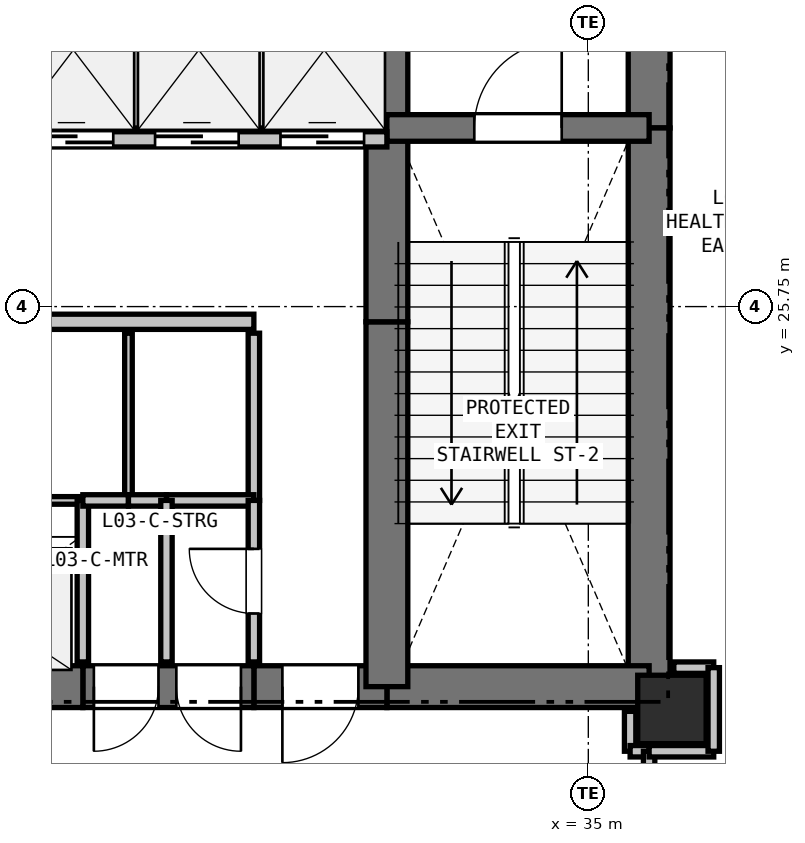
"""IFC4 building model, lengths in metres.
Left out: names, types, materials, properties, quantities, classifications, styles, units other than length and angle.
Written with IfcOpenShell. Run it as: python <this file> out.ifc"""

import sys

from ifc_helpers import new_model, si_unit, direction, frame, frame_2d, origin, origin_2d, place, context, subcontext, project, spatial, rectangle, extrude, element, fill, save


model = new_model("IFC4")
c1 = context("Model", 3, precision=1e-05, world=origin(), true_north=direction((0.0, 1.0)))
c2 = subcontext(c1, "Body", "Model", "MODEL_VIEW")
j1 = project(units=[si_unit("LENGTHUNIT", "METRE"), si_unit("PLANEANGLEUNIT", "RADIAN")], contexts=[c1])
p1 = place(None, origin())
s1 = spatial("IfcSite", under=j1, at=p1, CompositionType="ELEMENT")
p2 = place(p1, origin())
s2 = spatial("IfcBuilding", under=s1, at=p2, CompositionType="ELEMENT")
p3 = place(p2, frame((0.0, 0.0, 14.4)))
s3 = spatial("IfcBuildingStorey", under=s2, at=p3, CompositionType="ELEMENT", Elevation=14.4)
p4 = place(p3, frame((36.1, 20.45, 0.0), z_axis=(0.0, 0.0, 1.0), x_axis=(1.0, 0.0, 0.0)))
e1 = element("IfcColumn", 1, at=p4, inside=s3, PredefinedType="COLUMN", context=c2, shape_type="SweptSolid", body=[
    extrude(rectangle(XDim=0.9, YDim=0.9, at=origin_2d()), origin(), (0.0, 0.0, 1.0), 4.8),
])
p5 = place(p3, frame((35.8, 32.75, 0.0), z_axis=(0.0, 0.0, 1.0), x_axis=(0.0, -1.0, 0.0)))
e2 = element("IfcWall", 2, at=p5, inside=s3, PredefinedType="SHEAR", context=c2, shape_type="SweptSolid", body=[
    extrude(rectangle(XDim=4.65, YDim=0.55, at=frame_2d((2.325, 0.0))), origin(), (0.0, 0.0, 1.0), 4.52),
])
p6 = place(p3, frame((35.8, 28.1, 0.0), z_axis=(0.0, 0.0, 1.0), x_axis=(0.0, -1.0, 0.0)))
e3 = element("IfcWall", 3, at=p6, inside=s3, PredefinedType="SHEAR", context=c2, shape_type="SweptSolid", body=[
    extrude(rectangle(XDim=7.35, YDim=0.55, at=frame_2d((3.675, 0.0))), origin(), (0.0, 0.0, 1.0), 4.52),
])
p7 = place(p3, frame((35.8, 20.75, 0.0), z_axis=(0.0, 0.0, 1.0), x_axis=(-1.0, 0.0, 0.0)))
e4 = element("IfcWall", 4, at=p7, inside=s3, PredefinedType="SHEAR", context=c2, shape_type="SweptSolid", body=[
    extrude(rectangle(XDim=3.45, YDim=0.55, at=frame_2d((1.725, 0.0))), origin(), (0.0, 0.0, 1.0), 4.52),
])
p8 = place(p3, frame((32.35, 20.75, 0.0), z_axis=(0.0, 0.0, 1.0), x_axis=(-1.0, 0.0, 0.0)))
e5 = element("IfcWall", 5, at=p8, inside=s3, PredefinedType="SHEAR", context=c2, shape_type="SweptSolid", body=[
    extrude(rectangle(XDim=1.75, YDim=0.55, at=frame_2d((0.875, 0.0))), origin(), (0.0, 0.0, 1.0), 4.52),
])
p9 = place(p8, frame((0.375, 0.0, 0.0)))
e6 = element("IfcOpeningElement", 6, at=p9, cuts=e5, PredefinedType="OPENING", context=c2, shape_type="SweptSolid", body=[
    extrude(rectangle(XDim=1.0, YDim=2.15, at=frame_2d((0.5, 1.075))), frame((0.0, 0.285, 0.0), z_axis=(0.0, -1.0, 0.0), x_axis=(1.0, 0.0, 0.0)), (0.0, 0.0, 1.0), 0.57),
])
p10 = place(p3, frame((30.6, 20.75, 0.0), z_axis=(0.0, 0.0, 1.0), x_axis=(-1.0, 0.0, 0.0)))
e7 = element("IfcWall", 7, at=p10, inside=s3, PredefinedType="SHEAR", context=c2, shape_type="SweptSolid", body=[
    extrude(rectangle(XDim=2.25, YDim=0.55, at=frame_2d((1.125, 0.0))), origin(), (0.0, 0.0, 1.0), 4.52),
])
p11 = place(p10, frame((1.255, 0.0, 0.0)))
e8 = element("IfcOpeningElement", 8, at=p11, cuts=e7, PredefinedType="OPENING", context=c2, shape_type="SweptSolid", body=[
    extrude(rectangle(XDim=0.85, YDim=2.1, at=frame_2d((0.425, 1.05))), frame((0.0, 0.285, 0.0), z_axis=(0.0, -1.0, 0.0), x_axis=(1.0, 0.0, 0.0)), (0.0, 0.0, 1.0), 0.57),
])
p12 = place(p10, frame((0.17, 0.0, 0.0)))
e9 = element("IfcOpeningElement", 9, at=p12, cuts=e7, PredefinedType="OPENING", context=c2, shape_type="SweptSolid", body=[
    extrude(rectangle(XDim=0.85, YDim=2.1, at=frame_2d((0.425, 1.05))), frame((0.0, 0.285, 0.0), z_axis=(0.0, -1.0, 0.0), x_axis=(1.0, 0.0, 0.0)), (0.0, 0.0, 1.0), 0.57),
])
p13 = place(p3, frame((28.35, 20.75, 0.0), z_axis=(0.0, 0.0, 1.0), x_axis=(-1.0, 0.0, 0.0)))
e10 = element("IfcWall", 10, at=p13, inside=s3, PredefinedType="SHEAR", context=c2, shape_type="SweptSolid", body=[
    extrude(rectangle(XDim=2.7, YDim=0.55, at=frame_2d((1.35, 0.0))), origin(), (0.0, 0.0, 1.0), 4.52),
])
p14 = place(p3, frame((32.35, 20.75, 0.0), z_axis=(0.0, 0.0, 1.0), x_axis=(0.0, 1.0, 0.0)))
e11 = element("IfcWall", 11, at=p14, inside=s3, PredefinedType="SHEAR", context=c2, shape_type="SweptSolid", body=[
    extrude(rectangle(XDim=4.8, YDim=0.55, at=frame_2d((2.4, 0.0))), origin(), (0.0, 0.0, 1.0), 4.52),
])
p15 = place(p3, frame((32.35, 25.55, 0.0), z_axis=(0.0, 0.0, 1.0), x_axis=(0.0, 1.0, 0.0)))
e12 = element("IfcWall", 12, at=p15, inside=s3, PredefinedType="SHEAR", context=c2, shape_type="SweptSolid", body=[
    extrude(rectangle(XDim=2.4, YDim=0.55, at=frame_2d((1.2, 0.0))), origin(), (0.0, 0.0, 1.0), 4.52),
])
p16 = place(p3, frame((32.35, 27.95, 0.0), z_axis=(0.0, 0.0, 1.0), x_axis=(0.0, 1.0, 0.0)))
e13 = element("IfcWall", 13, at=p16, inside=s3, PredefinedType="SHEAR", context=c2, shape_type="SweptSolid", body=[
    extrude(rectangle(XDim=2.8, YDim=0.55, at=frame_2d((1.4, 0.0))), origin(), (0.0, 0.0, 1.0), 4.52),
])
p17 = place(p3, frame((32.35, 28.1, 0.0), z_axis=(0.0, 0.0, 1.0), x_axis=(1.0, 0.0, 0.0)))
e14 = element("IfcWall", 14, at=p17, inside=s3, PredefinedType="SHEAR", context=c2, shape_type="SweptSolid", body=[
    extrude(rectangle(XDim=3.45, YDim=0.35, at=frame_2d((1.725, 0.0))), origin(), (0.0, 0.0, 1.0), 4.52),
])
p18 = place(p17, frame((1.15, 0.0, 0.0)))
e15 = element("IfcOpeningElement", 15, at=p18, cuts=e14, PredefinedType="OPENING", context=c2, shape_type="SweptSolid", body=[
    extrude(rectangle(XDim=1.15, YDim=2.15, at=frame_2d((0.575, 1.075))), frame((0.0, 0.185, 0.0), z_axis=(0.0, -1.0, 0.0), x_axis=(1.0, 0.0, 0.0)), (0.0, 0.0, 1.0), 0.37),
])
p19 = place(p3, frame((25.65, 25.55, 0.0), z_axis=(0.0, 0.0, 1.0), x_axis=(1.0, 0.0, 0.0)))
e16 = element("IfcWall", 16, at=p19, inside=s3, PredefinedType="PARTITIONING", context=c2, shape_type="SweptSolid", body=[
    extrude(rectangle(XDim=4.95, YDim=0.2, at=frame_2d((2.475, 0.0))), origin(), (0.0, 0.0, 1.0), 4.52),
])
p20 = place(p3, frame((27.4, 27.95, 0.0), z_axis=(0.0, 0.0, 1.0), x_axis=(1.0, 0.0, 0.0)))
e17 = element("IfcWall", 17, at=p20, inside=s3, PredefinedType="PARTITIONING", context=c2, shape_type="SweptSolid", body=[
    extrude(rectangle(XDim=4.95, YDim=0.2, at=frame_2d((2.475, 0.0))), origin(), (0.0, 0.0, 1.0), 4.52),
])
p21 = place(p20, frame((0.25, 0.0, 0.0)))
e18 = element("IfcOpeningElement", 18, at=p21, cuts=e17, PredefinedType="OPENING", context=c2, shape_type="SweptSolid", body=[
    extrude(rectangle(XDim=1.1, YDim=2.15, at=frame_2d((0.55, 1.075))), frame((0.0, 0.11, 0.0), z_axis=(0.0, -1.0, 0.0), x_axis=(1.0, 0.0, 0.0)), (0.0, 0.0, 1.0), 0.22),
])
p22 = place(p20, frame((1.9, 0.0, 0.0)))
e19 = element("IfcOpeningElement", 19, at=p22, cuts=e17, PredefinedType="OPENING", context=c2, shape_type="SweptSolid", body=[
    extrude(rectangle(XDim=1.1, YDim=2.15, at=frame_2d((0.55, 1.075))), frame((0.0, 0.11, 0.0), z_axis=(0.0, -1.0, 0.0), x_axis=(1.0, 0.0, 0.0)), (0.0, 0.0, 1.0), 0.22),
])
p23 = place(p20, frame((3.55, 0.0, 0.0)))
e20 = element("IfcOpeningElement", 20, at=p23, cuts=e17, PredefinedType="OPENING", context=c2, shape_type="SweptSolid", body=[
    extrude(rectangle(XDim=1.1, YDim=2.15, at=frame_2d((0.55, 1.075))), frame((0.0, 0.11, 0.0), z_axis=(0.0, -1.0, 0.0), x_axis=(1.0, 0.0, 0.0)), (0.0, 0.0, 1.0), 0.22),
])
p24 = place(p3, frame((27.3, 23.2, 0.0), z_axis=(0.0, 0.0, 1.0), x_axis=(1.0, 0.0, 0.0)))
e21 = element("IfcWall", 21, at=p24, inside=s3, PredefinedType="PARTITIONING", context=c2, shape_type="SweptSolid", body=[
    extrude(rectangle(XDim=1.05, YDim=0.1, at=frame_2d((0.525, 0.0))), origin(), (0.0, 0.0, 1.0), 4.52),
])
p25 = place(p3, frame((28.35, 23.2, 0.0), z_axis=(0.0, 0.0, 1.0), x_axis=(0.0, -1.0, 0.0)))
e22 = element("IfcWall", 22, at=p25, inside=s3, PredefinedType="PARTITIONING", context=c2, shape_type="SweptSolid", body=[
    extrude(rectangle(XDim=2.125, YDim=0.15, at=frame_2d((1.062, 0.0))), origin(), (0.0, 0.0, 1.0), 4.52),
])
p26 = place(p3, frame((28.95, 25.4, 0.0), z_axis=(0.0, 0.0, 1.0), x_axis=(0.0, -1.0, 0.0)))
e23 = element("IfcWall", 23, at=p26, inside=s3, PredefinedType="PARTITIONING", context=c2, shape_type="SweptSolid", body=[
    extrude(rectangle(XDim=2.2, YDim=0.1, at=frame_2d((1.1, 0.0))), origin(), (0.0, 0.0, 1.0), 4.52),
])
p27 = place(p3, frame((28.95, 23.2, 0.0), z_axis=(0.0, 0.0, 1.0), x_axis=(-1.0, 0.0, 0.0)))
e24 = element("IfcWall", 24, at=p27, inside=s3, PredefinedType="PARTITIONING", context=c2, shape_type="SweptSolid", body=[
    extrude(rectangle(XDim=0.6, YDim=0.15, at=frame_2d((0.3, 0.0))), origin(), (0.0, 0.0, 1.0), 4.52),
])
p28 = place(p3, frame((30.6, 25.4, 0.0), z_axis=(0.0, 0.0, 1.0), x_axis=(0.0, -1.0, 0.0)))
e25 = element("IfcWall", 25, at=p28, inside=s3, PredefinedType="PARTITIONING", context=c2, shape_type="SweptSolid", body=[
    extrude(rectangle(XDim=2.2, YDim=0.15, at=frame_2d((1.1, 0.0))), origin(), (0.0, 0.0, 1.0), 4.52),
])
p29 = place(p3, frame((30.6, 23.2, 0.0), z_axis=(0.0, 0.0, 1.0), x_axis=(-1.0, 0.0, 0.0)))
e26 = element("IfcWall", 26, at=p29, inside=s3, PredefinedType="PARTITIONING", context=c2, shape_type="SweptSolid", body=[
    extrude(rectangle(XDim=1.15, YDim=0.15, at=frame_2d((0.575, 0.0))), origin(), (0.0, 0.0, 1.0), 4.52),
])
p30 = place(p3, frame((29.45, 23.2, 0.0), z_axis=(0.0, 0.0, 1.0), x_axis=(-1.0, 0.0, 0.0)))
e27 = element("IfcWall", 27, at=p30, inside=s3, PredefinedType="PARTITIONING", context=c2, shape_type="SweptSolid", body=[
    extrude(rectangle(XDim=0.5, YDim=0.15, at=frame_2d((0.25, 0.0))), origin(), (0.0, 0.0, 1.0), 4.52),
])
p31 = place(p3, frame((29.05, 30.3, 0.0), z_axis=(0.0, 0.0, 1.0), x_axis=(0.0, -1.0, 0.0)))
e28 = element("IfcWall", 28, at=p31, inside=s3, PredefinedType="PARTITIONING", context=c2, shape_type="SweptSolid", body=[
    extrude(rectangle(XDim=2.2, YDim=0.1, at=frame_2d((1.1, 0.0))), origin(), (0.0, 0.0, 1.0), 4.52),
])
p32 = place(p3, frame((30.7, 30.3, 0.0), z_axis=(0.0, 0.0, 1.0), x_axis=(0.0, -1.0, 0.0)))
e29 = element("IfcWall", 29, at=p32, inside=s3, PredefinedType="PARTITIONING", context=c2, shape_type="SweptSolid", body=[
    extrude(rectangle(XDim=2.2, YDim=0.125, at=frame_2d((1.1, 0.0))), origin(), (0.0, 0.0, 1.0), 4.52),
])
p33 = place(p3, frame((30.6, 21.075, 0.0), z_axis=(0.0, 0.0, 1.0), x_axis=(0.0, 1.0, 0.0)))
e30 = element("IfcWall", 30, at=p33, inside=s3, PredefinedType="PARTITIONING", context=c2, shape_type="SweptSolid", body=[
    extrude(rectangle(XDim=2.125, YDim=0.15, at=frame_2d((1.062, 0.0))), origin(), (0.0, 0.0, 1.0), 4.52),
])
p34 = place(p33, frame((0.637, 0.0, 0.0)))
e31 = element("IfcOpeningElement", 31, at=p34, cuts=e30, PredefinedType="OPENING", context=c2, shape_type="SweptSolid", body=[
    extrude(rectangle(XDim=0.85, YDim=2.1, at=frame_2d((0.425, 1.05))), frame((0.0, 0.085, 0.0), z_axis=(0.0, -1.0, 0.0), x_axis=(1.0, 0.0, 0.0)), (0.0, 0.0, 1.0), 0.17),
])
p35 = place(p3, frame((35.55, 20.425, 0.0), z_axis=(0.0, 0.0, 1.0), x_axis=(0.0, -1.0, 0.0)))
e32 = element("IfcWall", 32, at=p35, inside=s3, PredefinedType="PARTITIONING", context=c2, shape_type="SweptSolid", body=[
    extrude(rectangle(XDim=0.525, YDim=0.15, at=frame_2d((0.263, 0.0))), origin(), (0.0, 0.0, 1.0), 3.969),
])
p36 = place(p3, frame((35.55, 19.9, 0.0), z_axis=(0.0, 0.0, 1.0), x_axis=(1.0, 0.0, 0.0)))
e33 = element("IfcWall", 33, at=p36, inside=s3, PredefinedType="PARTITIONING", context=c2, shape_type="SweptSolid", body=[
    extrude(rectangle(XDim=0.25, YDim=0.15, at=frame_2d((0.125, 0.0))), origin(), (0.0, 0.0, 1.0), 4.52),
])
p37 = place(p3, frame((35.8, 19.9, 0.0), z_axis=(0.0, 0.0, 1.0), x_axis=(0.0, -1.0, 0.0)))
e34 = element("IfcWall", 34, at=p37, inside=s3, PredefinedType="PARTITIONING", context=c2, shape_type="SweptSolid", body=[
    extrude(rectangle(XDim=2.45, YDim=0.15, at=frame_2d((1.225, 0.0))), origin(), (0.0, 0.0, 1.0), 4.52),
])
p38 = place(p37, frame((0.725, 0.0, 0.0)))
e35 = element("IfcOpeningElement", 35, at=p38, cuts=e34, PredefinedType="OPENING", context=c2, shape_type="SweptSolid", body=[
    extrude(rectangle(XDim=1.0, YDim=2.15, at=frame_2d((0.5, 1.075))), frame((0.0, 0.085, 0.0), z_axis=(0.0, -1.0, 0.0), x_axis=(1.0, 0.0, 0.0)), (0.0, 0.0, 1.0), 0.17),
])
p39 = place(p3, frame((36.65, 21.0, 0.0), z_axis=(0.0, 0.0, 1.0), x_axis=(-1.0, 0.0, 0.0)))
e36 = element("IfcWall", 36, at=p39, inside=s3, PredefinedType="PARTITIONING", context=c2, shape_type="SweptSolid", body=[
    extrude(rectangle(XDim=0.525, YDim=0.15, at=frame_2d((0.262, 0.0))), origin(), (0.0, 0.0, 1.0), 3.969),
])
p40 = place(p3, frame((35.8, 19.9, 0.0), z_axis=(0.0, 0.0, 1.0), x_axis=(1.0, 0.0, 0.0)))
e37 = element("IfcWall", 37, at=p40, inside=s3, PredefinedType="PARTITIONING", context=c2, shape_type="SweptSolid", body=[
    extrude(rectangle(XDim=0.85, YDim=0.15, at=frame_2d((0.425, 0.0))), origin(), (0.0, 0.0, 1.0), 3.818),
])
p41 = place(p3, frame((36.65, 19.9, 0.0), z_axis=(0.0, 0.0, 1.0), x_axis=(0.0, 1.0, 0.0)))
e38 = element("IfcWall", 38, at=p41, inside=s3, PredefinedType="PARTITIONING", context=c2, shape_type="SweptSolid", body=[
    extrude(rectangle(XDim=1.1, YDim=0.15, at=frame_2d((0.55, 0.0))), origin(), (0.0, 0.0, 1.0), 4.52),
])
p42 = place(p3, frame((29.45, 23.2, 0.0), z_axis=(0.0, 0.0, 1.0), x_axis=(0.0, -1.0, 0.0)))
e39 = element("IfcWall", 39, at=p42, inside=s3, PredefinedType="PARTITIONING", context=c2, shape_type="SweptSolid", body=[
    extrude(rectangle(XDim=2.125, YDim=0.15, at=frame_2d((1.062, 0.0))), origin(), (0.0, 0.0, 1.0), 4.52),
])
p43 = place(p21, origin())
e40 = element("IfcDoor", 40, at=p43, inside=s3, OperationType="SLIDING_TO_LEFT", PredefinedType="DOOR", context=c2, shape_type="SweptSolid", body=[
    extrude(rectangle(XDim=1.1, YDim=2.15, at=frame_2d((0.55, 1.075))), frame((0.0, 0.025, 0.0), z_axis=(0.0, -1.0, 0.0), x_axis=(1.0, 0.0, 0.0)), (0.0, 0.0, 1.0), 0.05),
])
fill(e18, e40)
p44 = place(p22, origin())
e41 = element("IfcDoor", 41, at=p44, inside=s3, OperationType="SLIDING_TO_LEFT", PredefinedType="DOOR", context=c2, shape_type="SweptSolid", body=[
    extrude(rectangle(XDim=1.1, YDim=2.15, at=frame_2d((0.55, 1.075))), frame((0.0, 0.025, 0.0), z_axis=(0.0, -1.0, 0.0), x_axis=(1.0, 0.0, 0.0)), (0.0, 0.0, 1.0), 0.05),
])
fill(e19, e41)
p45 = place(p23, origin())
e42 = element("IfcDoor", 42, at=p45, inside=s3, OperationType="SLIDING_TO_LEFT", PredefinedType="DOOR", context=c2, shape_type="SweptSolid", body=[
    extrude(rectangle(XDim=1.1, YDim=2.15, at=frame_2d((0.55, 1.075))), frame((0.0, 0.025, 0.0), z_axis=(0.0, -1.0, 0.0), x_axis=(1.0, 0.0, 0.0)), (0.0, 0.0, 1.0), 0.05),
])
fill(e20, e42)
p46 = place(p9, origin())
e43 = element("IfcDoor", 43, at=p46, inside=s3, OperationType="SINGLE_SWING_RIGHT", PredefinedType="DOOR", context=c2, shape_type="SweptSolid", body=[
    extrude(rectangle(XDim=1.0, YDim=2.15, at=frame_2d((0.5, 1.075))), frame((0.0, 0.025, 0.0), z_axis=(0.0, -1.0, 0.0), x_axis=(1.0, 0.0, 0.0)), (0.0, 0.0, 1.0), 0.05),
])
fill(e6, e43)
p47 = place(p18, origin())
e44 = element("IfcDoor", 44, at=p47, inside=s3, OperationType="SINGLE_SWING_RIGHT", PredefinedType="DOOR", context=c2, shape_type="SweptSolid", body=[
    extrude(rectangle(XDim=1.15, YDim=2.15, at=frame_2d((0.575, 1.075))), frame((0.0, 0.025, 0.0), z_axis=(0.0, -1.0, 0.0), x_axis=(1.0, 0.0, 0.0)), (0.0, 0.0, 1.0), 0.05),
])
fill(e15, e44)
p48 = place(p34, origin())
e45 = element("IfcDoor", 45, at=p48, inside=s3, OperationType="SINGLE_SWING_RIGHT", PredefinedType="DOOR", context=c2, shape_type="SweptSolid", body=[
    extrude(rectangle(XDim=0.85, YDim=2.1, at=frame_2d((0.425, 1.05))), frame((0.0, 0.025, 0.0), z_axis=(0.0, -1.0, 0.0), x_axis=(1.0, 0.0, 0.0)), (0.0, 0.0, 1.0), 0.05),
])
fill(e31, e45)
p49 = place(p11, origin())
e46 = element("IfcDoor", 46, at=p49, inside=s3, OperationType="SINGLE_SWING_RIGHT", PredefinedType="DOOR", context=c2, shape_type="SweptSolid", body=[
    extrude(rectangle(XDim=0.85, YDim=2.1, at=frame_2d((0.425, 1.05))), frame((0.0, 0.025, 0.0), z_axis=(0.0, -1.0, 0.0), x_axis=(1.0, 0.0, 0.0)), (0.0, 0.0, 1.0), 0.05),
])
fill(e8, e46)
p50 = place(p12, origin())
e47 = element("IfcDoor", 47, at=p50, inside=s3, OperationType="SINGLE_SWING_LEFT", PredefinedType="DOOR", context=c2, shape_type="SweptSolid", body=[
    extrude(rectangle(XDim=0.85, YDim=2.1, at=frame_2d((0.425, 1.05))), frame((0.0, 0.025, 0.0), z_axis=(0.0, -1.0, 0.0), x_axis=(1.0, 0.0, 0.0)), (0.0, 0.0, 1.0), 0.05),
])
fill(e9, e47)
save(model, sys.argv[1])
